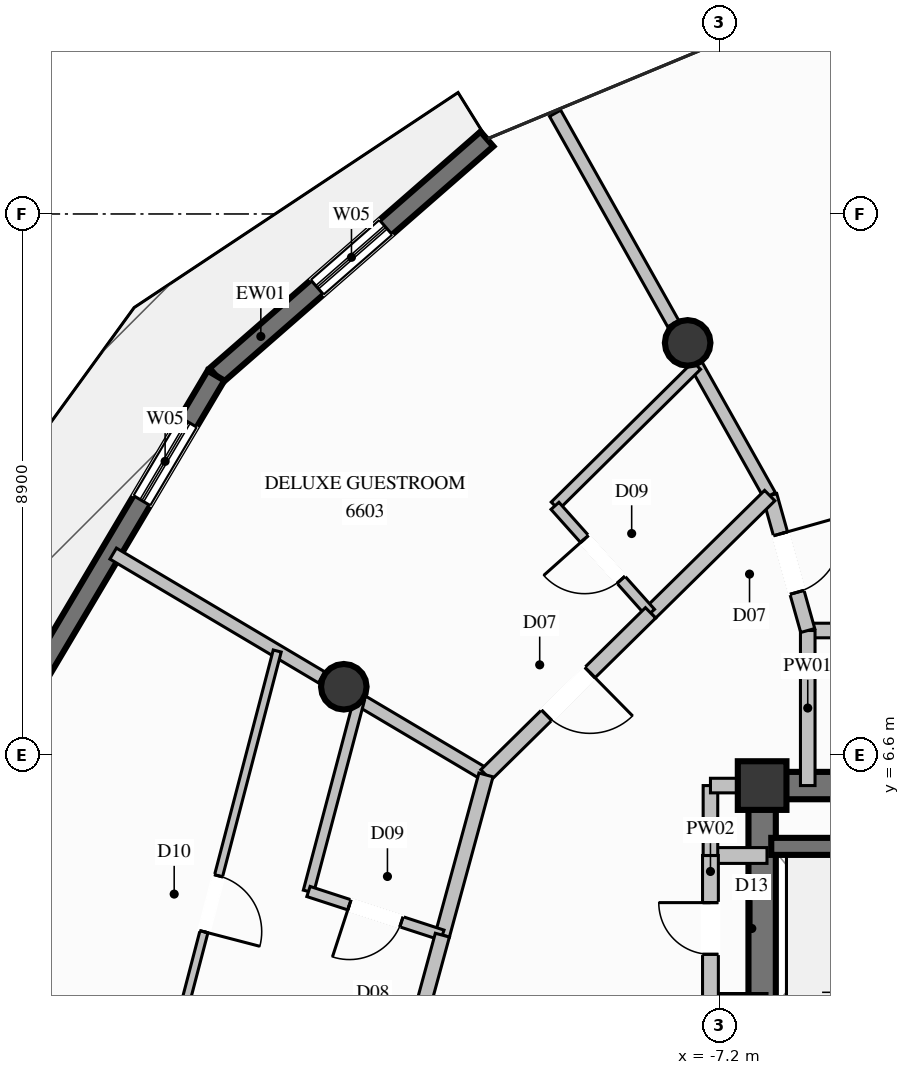
"""IFC4 building model, lengths in metres.
Left out: names, types, materials, properties, quantities, classifications, styles, units other than length and angle.
Written with IfcOpenShell. Run it as: python <this file> out.ifc"""

import sys

from ifc_helpers import new_model, si_unit, direction, frame, frame_2d, origin, origin_2d, place, context, subcontext, project, spatial, rectangle, circle, extrude, element, fill, save


model = new_model("IFC4")
c1 = context("Model", 3, precision=1e-05, world=origin(), true_north=direction((0.0, 1.0)))
c2 = subcontext(c1, "Body", "Model", "MODEL_VIEW")
j1 = project(units=[si_unit("LENGTHUNIT", "METRE"), si_unit("PLANEANGLEUNIT", "RADIAN")], contexts=[c1])
p1 = place(None, origin())
s1 = spatial("IfcSite", under=j1, at=p1, CompositionType="ELEMENT")
p2 = place(p1, origin())
s2 = spatial("IfcBuilding", under=s1, at=p2, CompositionType="ELEMENT")
p3 = place(p2, frame((0.0, 0.0, 246.8)))
s3 = spatial("IfcBuildingStorey", under=s2, at=p3, CompositionType="ELEMENT", Elevation=246.8)
p4 = place(p3, frame((-6.5, 6.1, 0.0), z_axis=(0.0, 0.0, 1.0), x_axis=(1.0, 0.0, 0.0)))
e1 = element("IfcColumn", 1, at=p4, inside=s3, PredefinedType="COLUMN", context=c2, shape_type="SweptSolid", body=[
    extrude(rectangle(XDim=0.8, YDim=0.8, at=origin_2d()), origin(), (0.0, 0.0, 1.0), 3.8),
])
p5 = place(p3, frame((-6.275, 6.1, 0.0), z_axis=(0.0, 0.0, 1.0), x_axis=(1.0, 0.0, 0.0)))
e2 = element("IfcWall", 2, at=p5, inside=s3, PredefinedType="SHEAR", context=c2, shape_type="SweptSolid", body=[
    extrude(rectangle(XDim=2.675, YDim=0.45, at=frame_2d((1.337, 0.0))), origin(), (0.0, 0.0, 1.0), 3.8),
])
p6 = place(p3, frame((-6.5, 2.35, 0.0), z_axis=(0.0, 0.0, 1.0), x_axis=(0.0, 1.0, 0.0)))
e3 = element("IfcWall", 3, at=p6, inside=s3, PredefinedType="SHEAR", context=c2, shape_type="SweptSolid", body=[
    extrude(rectangle(XDim=3.975, YDim=0.45, at=frame_2d((1.987, 0.0))), origin(), (0.0, 0.0, 1.0), 3.8),
])
for number, where, z_axis, x_axis in (
    (4, (-7.725, 13.38, 0.0), (0.0, 0.0, 1.0), (1.0, 0.0, 0.0)),
    (5, (-13.38, 7.725, 0.0), (0.0, 0.0, 1.0), (1.0, 0.0, 0.0)),
):
    element("IfcColumn", number, at=place(p3, frame(where, z_axis=z_axis, x_axis=x_axis)), inside=s3, PredefinedType="COLUMN", context=c2, shape_type="SweptSolid", body=[
        extrude(circle(Radius=0.375, at=origin_2d()), origin(), (0.0, 0.0, 1.0), 3.8),
    ])
p7 = place(p3, frame((-15.482, 12.842, 0.0), z_axis=(0.0, 0.0, 1.0), x_axis=(0.753261443664, 0.65772121563, 0.0)))
e6 = element("IfcWall", 6, at=p7, inside=s3, PredefinedType="SOLIDWALL", context=c2, shape_type="SweptSolid", body=[
    extrude(rectangle(XDim=5.916, YDim=0.32, at=frame_2d((2.958, 0.0))), origin(), (0.0, 0.0, 1.0), 3.57),
])
p8 = place(p7, frame((2.208, 0.0, 0.85)))
e7 = element("IfcOpeningElement", 7, at=p8, cuts=e6, PredefinedType="OPENING", context=c2, shape_type="SweptSolid", body=[
    extrude(rectangle(XDim=1.5, YDim=1.2, at=frame_2d((0.75, 0.6))), frame((0.0, 0.17, 0.0), z_axis=(0.0, -1.0, 0.0), x_axis=(1.0, 0.0, 0.0)), (0.0, 0.0, 1.0), 0.34),
])
p9 = place(p3, frame((-18.536, 7.695, 0.0), z_axis=(0.0, 0.0, 1.0), x_axis=(0.510284251863, 0.860005803644, 0.0)))
e8 = element("IfcWall", 8, at=p9, inside=s3, PredefinedType="SOLIDWALL", context=c2, shape_type="SweptSolid", body=[
    extrude(rectangle(XDim=5.985, YDim=0.32, at=frame_2d((2.992, 0.0))), origin(), (0.0, 0.0, 1.0), 3.57),
])
p10 = place(p9, frame((3.595, 0.0, 0.85)))
e9 = element("IfcOpeningElement", 9, at=p10, cuts=e8, PredefinedType="OPENING", context=c2, shape_type="SweptSolid", body=[
    extrude(rectangle(XDim=1.5, YDim=1.2, at=frame_2d((0.75, 0.6))), frame((0.0, 0.17, 0.0), z_axis=(0.0, -1.0, 0.0), x_axis=(1.0, 0.0, 0.0)), (0.0, 0.0, 1.0), 0.34),
])
p11 = place(p3, frame((-4.15, 5.1, 0.0), z_axis=(0.0, 0.0, 1.0), x_axis=(-1.0, 0.0, 0.0)))
e10 = element("IfcWall", 10, at=p11, inside=s3, PredefinedType="SOLIDWALL", context=c2, shape_type="SweptSolid", body=[
    extrude(rectangle(XDim=2.2, YDim=0.28, at=frame_2d((1.1, 0.0))), origin(), (0.0, 0.0, 1.0), 3.57),
])
for number, where, z_axis, x_axis in (
    (11, (-7.35, 4.95, 0.0), (0.0, 0.0, 1.0), (1.0, 0.0, 0.0)),
    (12, (-7.35, 2.55, 0.0), (0.0, 0.0, 1.0), (1.0, 0.0, 0.0)),
):
    element("IfcWall", number, at=place(p3, frame(where, z_axis=z_axis, x_axis=x_axis)), inside=s3, PredefinedType="PARTITIONING", context=c2, shape_type="SweptSolid", body=[
        extrude(rectangle(XDim=0.93, YDim=0.26, at=frame_2d((0.465, 0.0))), origin(), (0.0, 0.0, 1.0), 3.57),
    ])
p12 = place(p3, frame((-7.35, 2.55, 0.0), z_axis=(0.0, 0.0, 1.0), x_axis=(0.0, 1.0, 0.0)))
e13 = element("IfcWall", 13, at=p12, inside=s3, PredefinedType="PARTITIONING", context=c2, shape_type="SweptSolid", body=[
    extrude(rectangle(XDim=2.4, YDim=0.26, at=frame_2d((1.2, 0.0))), origin(), (0.0, 0.0, 1.0), 2.655),
])
p13 = place(p12, frame((0.775, 0.0, 0.0)))
e14 = element("IfcOpeningElement", 14, at=p13, cuts=e13, PredefinedType="OPENING", context=c2, shape_type="SweptSolid", body=[
    extrude(rectangle(XDim=0.85, YDim=2.05, at=frame_2d((0.425, 1.025))), frame((0.0, 0.14, 0.0), z_axis=(0.0, -1.0, 0.0), x_axis=(1.0, 0.0, 0.0)), (0.0, 0.0, 1.0), 0.28),
])
p14 = place(p3, frame((-5.75, 8.65, 0.0), z_axis=(0.0, 0.0, 1.0), x_axis=(1.0, 0.0, 0.0)))
e15 = element("IfcWall", 15, at=p14, inside=s3, PredefinedType="PARTITIONING", context=c2, shape_type="SweptSolid", body=[
    extrude(rectangle(XDim=11.5, YDim=0.24, at=frame_2d((5.75, 0.0))), origin(), (0.0, 0.0, 1.0), 3.57),
])
p15 = place(p3, frame((-5.75, 6.1, 0.0), z_axis=(0.0, 0.0, 1.0), x_axis=(0.0, 1.0, 0.0)))
e16 = element("IfcWall", 16, at=p15, inside=s3, PredefinedType="PARTITIONING", context=c2, shape_type="SweptSolid", body=[
    extrude(rectangle(XDim=2.55, YDim=0.24, at=frame_2d((1.275, 0.0))), origin(), (0.0, 0.0, 1.0), 3.57),
])
p16 = place(p3, frame((-7.35, 4.95, 0.0), z_axis=(0.0, 0.0, 1.0), x_axis=(0.0, 1.0, 0.0)))
e17 = element("IfcWall", 17, at=p16, inside=s3, PredefinedType="PARTITIONING", context=c2, shape_type="SweptSolid", body=[
    extrude(rectangle(XDim=1.15, YDim=0.24, at=frame_2d((0.575, 0.0))), origin(), (0.0, 0.0, 1.0), 2.655),
])
p17 = place(p3, frame((-7.35, 6.1, 0.0), z_axis=(0.0, 0.0, 1.0), x_axis=(1.0, 0.0, 0.0)))
e18 = element("IfcWall", 18, at=p17, inside=s3, PredefinedType="PARTITIONING", context=c2, shape_type="SweptSolid", body=[
    extrude(rectangle(XDim=0.85, YDim=0.24, at=frame_2d((0.425, 0.0))), origin(), (0.0, 0.0, 1.0), 3.011),
])
p18 = place(p3, frame((-6.375, 10.869, 0.0), z_axis=(0.0, 0.0, 1.0), x_axis=(-0.489667191284, 0.871909422922, 0.0)))
e19 = element("IfcWall", 19, at=p18, inside=s3, PredefinedType="PARTITIONING", context=c2, shape_type="SweptSolid", body=[
    extrude(rectangle(XDim=2.459, YDim=0.21, at=frame_2d((1.229, 0.0))), origin(), (0.0, 0.0, 1.0), 3.011),
])
p19 = place(p3, frame((-7.962, 13.696, 0.0), z_axis=(0.0, 0.0, 1.0), x_axis=(-0.489665242016, 0.871910517634, 0.0)))
e20 = element("IfcWall", 20, at=p19, inside=s3, PredefinedType="PARTITIONING", context=c2, shape_type="SweptSolid", body=[
    extrude(rectangle(XDim=3.968, YDim=0.21, at=frame_2d((1.984, 0.0))), origin(), (0.0, 0.0, 1.0), 3.57),
])
p20 = place(p3, frame((-11.042, 6.275, 0.0), z_axis=(0.0, 0.0, 1.0), x_axis=(-0.859975377651, 0.510335526721, 0.0)))
e21 = element("IfcWall", 21, at=p20, inside=s3, PredefinedType="PARTITIONING", context=c2, shape_type="SweptSolid", body=[
    extrude(rectangle(XDim=2.359, YDim=0.21, at=frame_2d((1.18, 0.0))), origin(), (0.0, 0.0, 1.0), 3.011),
])
p21 = place(p3, frame((-13.744, 7.879, 0.0), z_axis=(0.0, 0.0, 1.0), x_axis=(-0.859849705024, 0.510547240488, 0.0)))
e22 = element("IfcWall", 22, at=p21, inside=s3, PredefinedType="PARTITIONING", context=c2, shape_type="SweptSolid", body=[
    extrude(rectangle(XDim=3.988, YDim=0.21, at=frame_2d((1.994, 0.0))), origin(), (0.0, 0.0, 1.0), 3.57),
])
p22 = place(p3, frame((-6.375, 10.869, 0.0), z_axis=(0.0, 0.0, 1.0), x_axis=(0.271110513922, -0.962548226969, 0.0)))
e23 = element("IfcWall", 23, at=p22, inside=s3, PredefinedType="PARTITIONING", context=c2, shape_type="SweptSolid", body=[
    extrude(rectangle(XDim=2.305, YDim=0.24, at=frame_2d((1.153, 0.0))), origin(), (0.0, 0.0, 1.0), 3.57),
])
p23 = place(p22, frame((0.653, 0.0, 0.0)))
e24 = element("IfcOpeningElement", 24, at=p23, cuts=e23, PredefinedType="OPENING", context=c2, shape_type="SweptSolid", body=[
    extrude(rectangle(XDim=1.0, YDim=2.2, at=frame_2d((0.5, 1.1))), frame((0.0, 0.13, 0.0), z_axis=(0.0, -1.0, 0.0), x_axis=(1.0, 0.0, 0.0)), (0.0, 0.0, 1.0), 0.26),
])
p24 = place(p3, frame((-6.375, 10.869, 0.0), z_axis=(0.0, 0.0, 1.0), x_axis=(-0.712721806089, -0.701446809904, 0.0)))
e25 = element("IfcWall", 25, at=p24, inside=s3, PredefinedType="PARTITIONING", context=c2, shape_type="SweptSolid", body=[
    extrude(rectangle(XDim=2.75, YDim=0.24, at=frame_2d((1.375, 0.0))), origin(), (0.0, 0.0, 1.0), 3.57),
])
p25 = place(p3, frame((-7.575, 13.007, 0.0), z_axis=(0.0, 0.0, 1.0), x_axis=(-0.710892186869, -0.703301001456, 0.0)))
e26 = element("IfcWall", 26, at=p25, inside=s3, PredefinedType="PLUMBINGWALL", context=c2, shape_type="SweptSolid", body=[
    extrude(rectangle(XDim=3.281, YDim=0.175, at=frame_2d((1.64, 0.0))), origin(), (0.0, 0.0, 1.0), 3.139),
])
p26 = place(p3, frame((-8.335, 8.94, 0.0), z_axis=(0.0, 0.0, 1.0), x_axis=(-0.666153503552, 0.745814661766, 0.0)))
e27 = element("IfcWall", 27, at=p26, inside=s3, PredefinedType="PLUMBINGWALL", context=c2, shape_type="SweptSolid", body=[
    extrude(rectangle(XDim=2.36, YDim=0.175, at=frame_2d((1.18, 0.0))), origin(), (0.0, 0.0, 1.0), 3.57),
])
p27 = place(p26, frame((0.73, 0.0, 0.0)))
e28 = element("IfcOpeningElement", 28, at=p27, cuts=e27, PredefinedType="OPENING", context=c2, shape_type="SweptSolid", body=[
    extrude(rectangle(XDim=0.9, YDim=2.1, at=frame_2d((0.45, 1.05))), frame((0.0, 0.098, 0.0), z_axis=(0.0, -1.0, 0.0), x_axis=(1.0, 0.0, 0.0)), (0.0, 0.0, 1.0), 0.195),
])
p28 = place(p3, frame((-8.335, 8.94, 0.0), z_axis=(0.0, 0.0, 1.0), x_axis=(-0.712612295011, -0.701558063883, 0.0)))
e29 = element("IfcWall", 29, at=p28, inside=s3, PredefinedType="PARTITIONING", context=c2, shape_type="SweptSolid", body=[
    extrude(rectangle(XDim=3.799, YDim=0.24, at=frame_2d((1.899, 0.0))), origin(), (0.0, 0.0, 1.0), 3.57),
])
p29 = place(p28, frame((1.399, 0.0, 0.0)))
e30 = element("IfcOpeningElement", 30, at=p29, cuts=e29, PredefinedType="OPENING", context=c2, shape_type="SweptSolid", body=[
    extrude(rectangle(XDim=1.0, YDim=2.2, at=frame_2d((0.5, 1.1))), frame((0.0, 0.13, 0.0), z_axis=(0.0, -1.0, 0.0), x_axis=(1.0, 0.0, 0.0)), (0.0, 0.0, 1.0), 0.26),
])
p30 = place(p3, frame((-11.042, 6.275, 0.0), z_axis=(0.0, 0.0, 1.0), x_axis=(-0.262572701387, -0.964912211803, 0.0)))
e31 = element("IfcWall", 31, at=p30, inside=s3, PredefinedType="PARTITIONING", context=c2, shape_type="SweptSolid", body=[
    extrude(rectangle(XDim=2.731, YDim=0.24, at=frame_2d((1.365, 0.0))), origin(), (0.0, 0.0, 1.0), 3.57),
])
p31 = place(p3, frame((-13.127, 7.513, 0.0), z_axis=(0.0, 0.0, 1.0), x_axis=(-0.25555737321, -0.966793891684, 0.0)))
e32 = element("IfcWall", 32, at=p31, inside=s3, PredefinedType="PLUMBINGWALL", context=c2, shape_type="SweptSolid", body=[
    extrude(rectangle(XDim=3.263, YDim=0.175, at=frame_2d((1.632, 0.0))), origin(), (0.0, 0.0, 1.0), 3.006),
])
p32 = place(p3, frame((-11.759, 3.64, 0.0), z_axis=(0.0, 0.0, 1.0), x_axis=(-0.950729164037, 0.310022671187, 0.0)))
e33 = element("IfcWall", 33, at=p32, inside=s3, PredefinedType="PLUMBINGWALL", context=c2, shape_type="SweptSolid", body=[
    extrude(rectangle(XDim=2.316, YDim=0.175, at=frame_2d((1.158, 0.0))), origin(), (0.0, 0.0, 1.0), 3.57),
])
p33 = place(p32, frame((0.708, 0.0, 0.0)))
e34 = element("IfcOpeningElement", 34, at=p33, cuts=e33, PredefinedType="OPENING", context=c2, shape_type="SweptSolid", body=[
    extrude(rectangle(XDim=0.9, YDim=2.1, at=frame_2d((0.45, 1.05))), frame((0.0, 0.098, 0.0), z_axis=(0.0, -1.0, 0.0), x_axis=(1.0, 0.0, 0.0)), (0.0, 0.0, 1.0), 0.195),
])
p34 = place(p3, frame((-11.759, 3.64, 0.0), z_axis=(0.0, 0.0, 1.0), x_axis=(-0.2626902414, -0.964880219029, 0.0)))
e35 = element("IfcWall", 35, at=p34, inside=s3, PredefinedType="PARTITIONING", context=c2, shape_type="SweptSolid", body=[
    extrude(rectangle(XDim=3.772, YDim=0.24, at=frame_2d((1.886, 0.0))), origin(), (0.0, 0.0, 1.0), 3.57),
])
p35 = place(p34, frame((1.336, 0.0, 0.0)))
e36 = element("IfcOpeningElement", 36, at=p35, cuts=e35, PredefinedType="OPENING", context=c2, shape_type="SweptSolid", body=[
    extrude(rectangle(XDim=1.1, YDim=2.3, at=frame_2d((0.55, 1.15))), frame((0.0, 0.13, 0.0), z_axis=(0.0, -1.0, 0.0), x_axis=(1.0, 0.0, 0.0)), (0.0, 0.0, 1.0), 0.26),
])
p36 = place(p3, frame((-14.475, 8.313, 0.0), z_axis=(0.0, 0.0, 1.0), x_axis=(-0.252565334536, -0.967579842592, 0.0)))
e37 = element("IfcWall", 37, at=p36, inside=s3, PredefinedType="PARTITIONING", context=c2, shape_type="SweptSolid", body=[
    extrude(rectangle(XDim=8.592, YDim=0.135, at=frame_2d((4.296, 0.0))), origin(), (0.0, 0.0, 1.0), 3.57),
])
p37 = place(p36, frame((3.821, 0.0, 0.0)))
e38 = element("IfcOpeningElement", 38, at=p37, cuts=e37, PredefinedType="OPENING", context=c2, shape_type="SweptSolid", body=[
    extrude(rectangle(XDim=0.95, YDim=2.1, at=frame_2d((0.475, 1.05))), frame((0.0, 0.078, 0.0), z_axis=(0.0, -1.0, 0.0), x_axis=(1.0, 0.0, 0.0)), (0.0, 0.0, 1.0), 0.155),
])
p38 = place(p8, origin())
e39 = element("IfcWindow", 39, at=p38, inside=s3, PartitioningType="SINGLE_PANEL", PredefinedType="WINDOW", context=c2, shape_type="SweptSolid", body=[
    extrude(rectangle(XDim=1.5, YDim=1.2, at=frame_2d((0.75, 0.6))), frame((0.0, 0.03, 0.0), z_axis=(0.0, -1.0, 0.0), x_axis=(1.0, 0.0, 0.0)), (0.0, 0.0, 1.0), 0.06),
])
fill(e7, e39)
p39 = place(p10, origin())
e40 = element("IfcWindow", 40, at=p39, inside=s3, PartitioningType="SINGLE_PANEL", PredefinedType="WINDOW", context=c2, shape_type="SweptSolid", body=[
    extrude(rectangle(XDim=1.5, YDim=1.2, at=frame_2d((0.75, 0.6))), frame((0.0, 0.03, 0.0), z_axis=(0.0, -1.0, 0.0), x_axis=(1.0, 0.0, 0.0)), (0.0, 0.0, 1.0), 0.06),
])
fill(e9, e40)
p40 = place(p13, origin())
e41 = element("IfcDoor", 41, at=p40, inside=s3, OperationType="SINGLE_SWING_RIGHT", PredefinedType="DOOR", context=c2, shape_type="SweptSolid", body=[
    extrude(rectangle(XDim=0.85, YDim=2.05, at=frame_2d((0.425, 1.025))), frame((0.0, 0.025, 0.0), z_axis=(0.0, -1.0, 0.0), x_axis=(1.0, 0.0, 0.0)), (0.0, 0.0, 1.0), 0.05),
])
fill(e14, e41)
p41 = place(p23, origin())
e42 = element("IfcDoor", 42, at=p41, inside=s3, OperationType="SINGLE_SWING_LEFT", PredefinedType="DOOR", context=c2, shape_type="SweptSolid", body=[
    extrude(rectangle(XDim=1.0, YDim=2.2, at=frame_2d((0.5, 1.1))), frame((0.0, 0.025, 0.0), z_axis=(0.0, -1.0, 0.0), x_axis=(1.0, 0.0, 0.0)), (0.0, 0.0, 1.0), 0.05),
])
fill(e24, e42)
p42 = place(p27, origin())
e43 = element("IfcDoor", 43, at=p42, inside=s3, OperationType="SINGLE_SWING_RIGHT", PredefinedType="DOOR", context=c2, shape_type="SweptSolid", body=[
    extrude(rectangle(XDim=0.9, YDim=2.1, at=frame_2d((0.45, 1.05))), frame((0.0, 0.025, 0.0), z_axis=(0.0, -1.0, 0.0), x_axis=(1.0, 0.0, 0.0)), (0.0, 0.0, 1.0), 0.05),
])
fill(e28, e43)
p43 = place(p29, origin())
e44 = element("IfcDoor", 44, at=p43, inside=s3, OperationType="SINGLE_SWING_LEFT", PredefinedType="DOOR", context=c2, shape_type="SweptSolid", body=[
    extrude(rectangle(XDim=1.0, YDim=2.2, at=frame_2d((0.5, 1.1))), frame((0.0, 0.025, 0.0), z_axis=(0.0, -1.0, 0.0), x_axis=(1.0, 0.0, 0.0)), (0.0, 0.0, 1.0), 0.05),
])
fill(e30, e44)
p44 = place(p33, origin())
e45 = element("IfcDoor", 45, at=p44, inside=s3, OperationType="SINGLE_SWING_RIGHT", PredefinedType="DOOR", context=c2, shape_type="SweptSolid", body=[
    extrude(rectangle(XDim=0.9, YDim=2.1, at=frame_2d((0.45, 1.05))), frame((0.0, 0.025, 0.0), z_axis=(0.0, -1.0, 0.0), x_axis=(1.0, 0.0, 0.0)), (0.0, 0.0, 1.0), 0.05),
])
fill(e34, e45)
p45 = place(p37, origin())
e46 = element("IfcDoor", 46, at=p45, inside=s3, OperationType="SINGLE_SWING_RIGHT", PredefinedType="DOOR", context=c2, shape_type="SweptSolid", body=[
    extrude(rectangle(XDim=0.95, YDim=2.1, at=frame_2d((0.475, 1.05))), frame((0.0, 0.025, 0.0), z_axis=(0.0, -1.0, 0.0), x_axis=(1.0, 0.0, 0.0)), (0.0, 0.0, 1.0), 0.05),
])
fill(e38, e46)
save(model, sys.argv[1])
